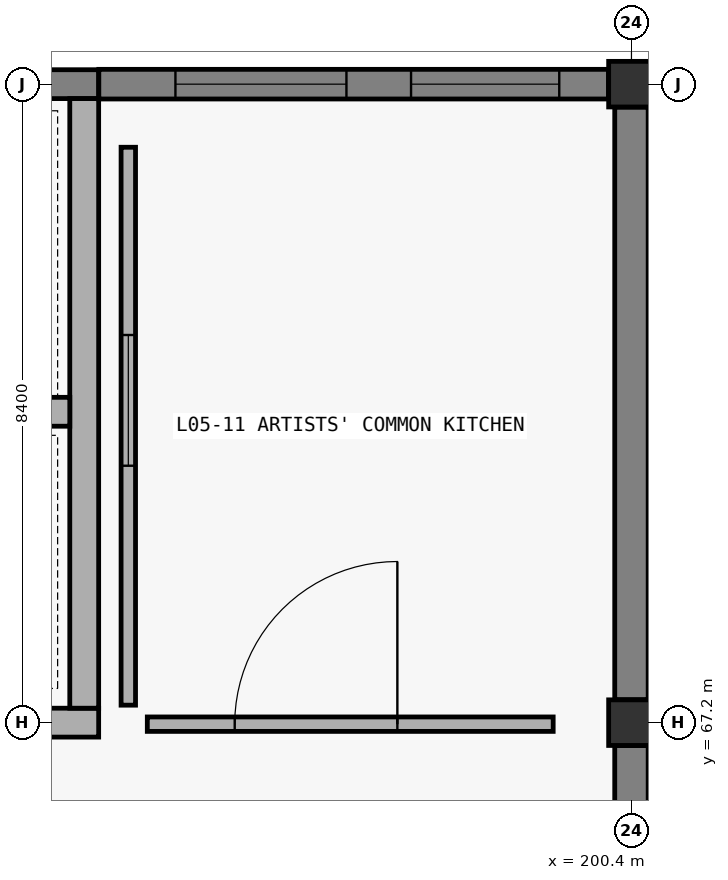
"""IFC4 building model, lengths in metres.
Left out: names, types, materials, properties, quantities, classifications, styles, units other than length and angle.
Written with IfcOpenShell. Run it as: python <this file> out.ifc"""

import sys

from ifc_helpers import new_model, si_unit, direction, frame, frame_2d, origin, origin_2d, place, context, subcontext, project, spatial, rectangle, extrude, element, fill, save


model = new_model("IFC4")
c1 = context("Model", 3, precision=1e-05, world=origin(), true_north=direction((0.0, 1.0)))
c2 = subcontext(c1, "Body", "Model", "MODEL_VIEW")
j1 = project(units=[si_unit("LENGTHUNIT", "METRE"), si_unit("PLANEANGLEUNIT", "RADIAN")], contexts=[c1])
p1 = place(None, origin())
s1 = spatial("IfcSite", under=j1, at=p1, CompositionType="ELEMENT")
p2 = place(p1, origin())
s2 = spatial("IfcBuilding", under=s1, at=p2, CompositionType="ELEMENT")
p3 = place(p2, frame((0.0, 0.0, 26.4)))
s3 = spatial("IfcBuildingStorey", under=s2, at=p3, CompositionType="ELEMENT", Elevation=26.4)
for number, where, z_axis, x_axis in (
    (1, (200.4, 67.2, 0.0), (0.0, 0.0, 1.0), (1.0, 0.0, 0.0)),
    (2, (200.4, 75.6, 0.0), (0.0, 0.0, 1.0), (1.0, 0.0, 0.0)),
):
    element("IfcColumn", number, at=place(p3, frame(where, z_axis=z_axis, x_axis=x_axis)), inside=s3, PredefinedType="COLUMN", context=c2, shape_type="SweptSolid", body=[
        extrude(rectangle(XDim=0.6, YDim=0.6, at=origin_2d()), origin(), (0.0, 0.0, 1.0), 4.5),
    ])
p4 = place(p3, frame((184.01, 67.2, 0.0), z_axis=(0.0, 0.0, 1.0), x_axis=(1.0, 0.0, 0.0)))
e3 = element("IfcWall", 3, at=p4, inside=s3, PredefinedType="SHEAR", context=c2, shape_type="SweptSolid", body=[
    extrude(rectangle(XDim=9.38, YDim=0.38, at=frame_2d((4.69, 0.0))), origin(), (0.0, 0.0, 1.0), 4.5),
])
p5 = place(p4, frame((1.75, 0.0, 0.0)))
e4 = element("IfcOpeningElement", 4, at=p5, cuts=e3, PredefinedType="OPENING", context=c2, shape_type="SweptSolid", body=[
    extrude(rectangle(XDim=1.18, YDim=2.24, at=frame_2d((0.59, 1.12))), frame((0.0, 0.2, 0.0), z_axis=(0.0, -1.0, 0.0), x_axis=(1.0, 0.0, 0.0)), (0.0, 0.0, 1.0), 0.4),
])
p6 = place(p3, frame((184.01, 75.6, 0.0), z_axis=(0.0, 0.0, 1.0), x_axis=(1.0, 0.0, 0.0)))
e5 = element("IfcWall", 5, at=p6, inside=s3, PredefinedType="SHEAR", context=c2, shape_type="SweptSolid", body=[
    extrude(rectangle(XDim=9.38, YDim=0.38, at=frame_2d((4.69, 0.0))), origin(), (0.0, 0.0, 1.0), 4.5),
])
p7 = place(p3, frame((193.2, 67.39, 0.0), z_axis=(0.0, 0.0, 1.0), x_axis=(0.0, 1.0, 0.0)))
e6 = element("IfcWall", 6, at=p7, inside=s3, PredefinedType="SHEAR", context=c2, shape_type="SweptSolid", body=[
    extrude(rectangle(XDim=8.02, YDim=0.38, at=frame_2d((4.01, 0.0))), origin(), (0.0, 0.0, 1.0), 4.5),
])
p8 = place(p3, frame((184.39, 71.29, 0.0), z_axis=(0.0, 0.0, 1.0), x_axis=(1.0, 0.0, 0.0)))
e7 = element("IfcWall", 7, at=p8, inside=s3, PredefinedType="SHEAR", context=c2, shape_type="SweptSolid", body=[
    extrude(rectangle(XDim=8.62, YDim=0.38, at=frame_2d((4.31, 0.0))), origin(), (0.0, 0.0, 1.0), 4.5),
])
p9 = place(p8, frame((0.45, 0.0, 0.0)))
e8 = element("IfcOpeningElement", 8, at=p9, cuts=e7, PredefinedType="OPENING", context=c2, shape_type="SweptSolid", body=[
    extrude(rectangle(XDim=1.08, YDim=2.18, at=frame_2d((0.54, 1.09))), frame((0.0, 0.2, 0.0), z_axis=(0.0, -1.0, 0.0), x_axis=(1.0, 0.0, 0.0)), (0.0, 0.0, 1.0), 0.4),
])
p10 = place(p3, frame((193.392, 75.6, 0.0), z_axis=(0.0, 0.0, 1.0), x_axis=(1.0, 0.0, 0.0)))
e9 = element("IfcWall", 9, at=p10, inside=s3, PredefinedType="SOLIDWALL", context=c2, shape_type="SweptSolid", body=[
    extrude(rectangle(XDim=6.706, YDim=0.39, at=frame_2d((3.353, 0.0))), origin(), (0.0, 0.0, 1.0), 3.78),
])
p11 = place(p10, frame((1.008, 0.0, 0.85)))
e10 = element("IfcOpeningElement", 10, at=p11, cuts=e9, PredefinedType="OPENING", context=c2, shape_type="SweptSolid", body=[
    extrude(rectangle(XDim=2.25, YDim=2.25, at=frame_2d((1.125, 1.125))), frame((0.0, 0.205, 0.0), z_axis=(0.0, -1.0, 0.0), x_axis=(1.0, 0.0, 0.0)), (0.0, 0.0, 1.0), 0.41),
])
p12 = place(p10, frame((4.108, 0.0, 0.85)))
e11 = element("IfcOpeningElement", 11, at=p12, cuts=e9, PredefinedType="OPENING", context=c2, shape_type="SweptSolid", body=[
    extrude(rectangle(XDim=1.95, YDim=2.3, at=frame_2d((0.975, 1.15))), frame((0.0, 0.205, 0.0), z_axis=(0.0, -1.0, 0.0), x_axis=(1.0, 0.0, 0.0)), (0.0, 0.0, 1.0), 0.41),
])
p13 = place(p3, frame((200.4, 59.102, 0.0), z_axis=(0.0, 0.0, 1.0), x_axis=(0.0, 1.0, 0.0)))
e12 = element("IfcWall", 12, at=p13, inside=s3, PredefinedType="SOLIDWALL", context=c2, shape_type="SweptSolid", body=[
    extrude(rectangle(XDim=7.796, YDim=0.44, at=frame_2d((3.898, 0.0))), origin(), (0.0, 0.0, 1.0), 3.78),
])
p14 = place(p3, frame((200.4, 67.502, 0.0), z_axis=(0.0, 0.0, 1.0), x_axis=(0.0, 1.0, 0.0)))
e13 = element("IfcWall", 13, at=p14, inside=s3, PredefinedType="SOLIDWALL", context=c2, shape_type="SweptSolid", body=[
    extrude(rectangle(XDim=7.796, YDim=0.44, at=frame_2d((3.898, 0.0))), origin(), (0.0, 0.0, 1.0), 3.78),
])
p15 = place(p3, frame((194.03, 67.18, 0.0), z_axis=(0.0, 0.0, 1.0), x_axis=(1.0, 0.0, 0.0)))
e14 = element("IfcWall", 14, at=p15, inside=s3, PredefinedType="PARTITIONING", context=c2, shape_type="SweptSolid", body=[
    extrude(rectangle(XDim=5.34, YDim=0.19, at=frame_2d((2.67, 0.0))), origin(), (0.0, 0.0, 1.0), 3.73),
])
p16 = place(p15, frame((1.15, 0.0, 0.0)))
e15 = element("IfcOpeningElement", 15, at=p16, cuts=e14, PredefinedType="OPENING", context=c2, shape_type="SweptSolid", body=[
    extrude(rectangle(XDim=2.14, YDim=2.62, at=frame_2d((1.07, 1.31))), frame((0.0, 0.105, 0.0), z_axis=(0.0, -1.0, 0.0), x_axis=(1.0, 0.0, 0.0)), (0.0, 0.0, 1.0), 0.21),
])
p17 = place(p3, frame((193.78, 67.43, 0.0), z_axis=(0.0, 0.0, 1.0), x_axis=(0.0, 1.0, 0.0)))
e16 = element("IfcWall", 16, at=p17, inside=s3, PredefinedType="PARTITIONING", context=c2, shape_type="SweptSolid", body=[
    extrude(rectangle(XDim=7.34, YDim=0.19, at=frame_2d((3.67, 0.0))), origin(), (0.0, 0.0, 1.0), 3.73),
])
p18 = place(p17, frame((3.15, 0.0, 0.9)))
e17 = element("IfcOpeningElement", 17, at=p18, cuts=e16, PredefinedType="OPENING", context=c2, shape_type="SweptSolid", body=[
    extrude(rectangle(XDim=1.72, YDim=1.46, at=frame_2d((0.86, 0.73))), frame((0.0, 0.105, 0.0), z_axis=(0.0, -1.0, 0.0), x_axis=(1.0, 0.0, 0.0)), (0.0, 0.0, 1.0), 0.21),
])
p19 = place(p11, origin())
e18 = element("IfcWindow", 18, at=p19, inside=s3, PartitioningType="SINGLE_PANEL", PredefinedType="WINDOW", context=c2, shape_type="SweptSolid", body=[
    extrude(rectangle(XDim=2.25, YDim=2.25, at=frame_2d((1.125, 1.125))), frame((0.0, 0.03, 0.0), z_axis=(0.0, -1.0, 0.0), x_axis=(1.0, 0.0, 0.0)), (0.0, 0.0, 1.0), 0.06),
])
fill(e10, e18)
p20 = place(p12, origin())
e19 = element("IfcWindow", 19, at=p20, inside=s3, PartitioningType="SINGLE_PANEL", PredefinedType="WINDOW", context=c2, shape_type="SweptSolid", body=[
    extrude(rectangle(XDim=1.95, YDim=2.3, at=frame_2d((0.975, 1.15))), frame((0.0, 0.03, 0.0), z_axis=(0.0, -1.0, 0.0), x_axis=(1.0, 0.0, 0.0)), (0.0, 0.0, 1.0), 0.06),
])
fill(e11, e19)
p21 = place(p16, origin())
e20 = element("IfcDoor", 20, at=p21, inside=s3, OperationType="DOUBLE_SWING_RIGHT", PredefinedType="DOOR", context=c2, shape_type="SweptSolid", body=[
    extrude(rectangle(XDim=2.14, YDim=2.62, at=frame_2d((1.07, 1.31))), frame((0.0, 0.025, 0.0), z_axis=(0.0, -1.0, 0.0), x_axis=(1.0, 0.0, 0.0)), (0.0, 0.0, 1.0), 0.05),
])
fill(e15, e20)
p22 = place(p18, origin())
e21 = element("IfcWindow", 21, at=p22, inside=s3, PartitioningType="SINGLE_PANEL", PredefinedType="WINDOW", context=c2, shape_type="SweptSolid", body=[
    extrude(rectangle(XDim=1.72, YDim=1.46, at=frame_2d((0.86, 0.73))), frame((0.0, 0.03, 0.0), z_axis=(0.0, -1.0, 0.0), x_axis=(1.0, 0.0, 0.0)), (0.0, 0.0, 1.0), 0.06),
])
fill(e17, e21)
save(model, sys.argv[1])
